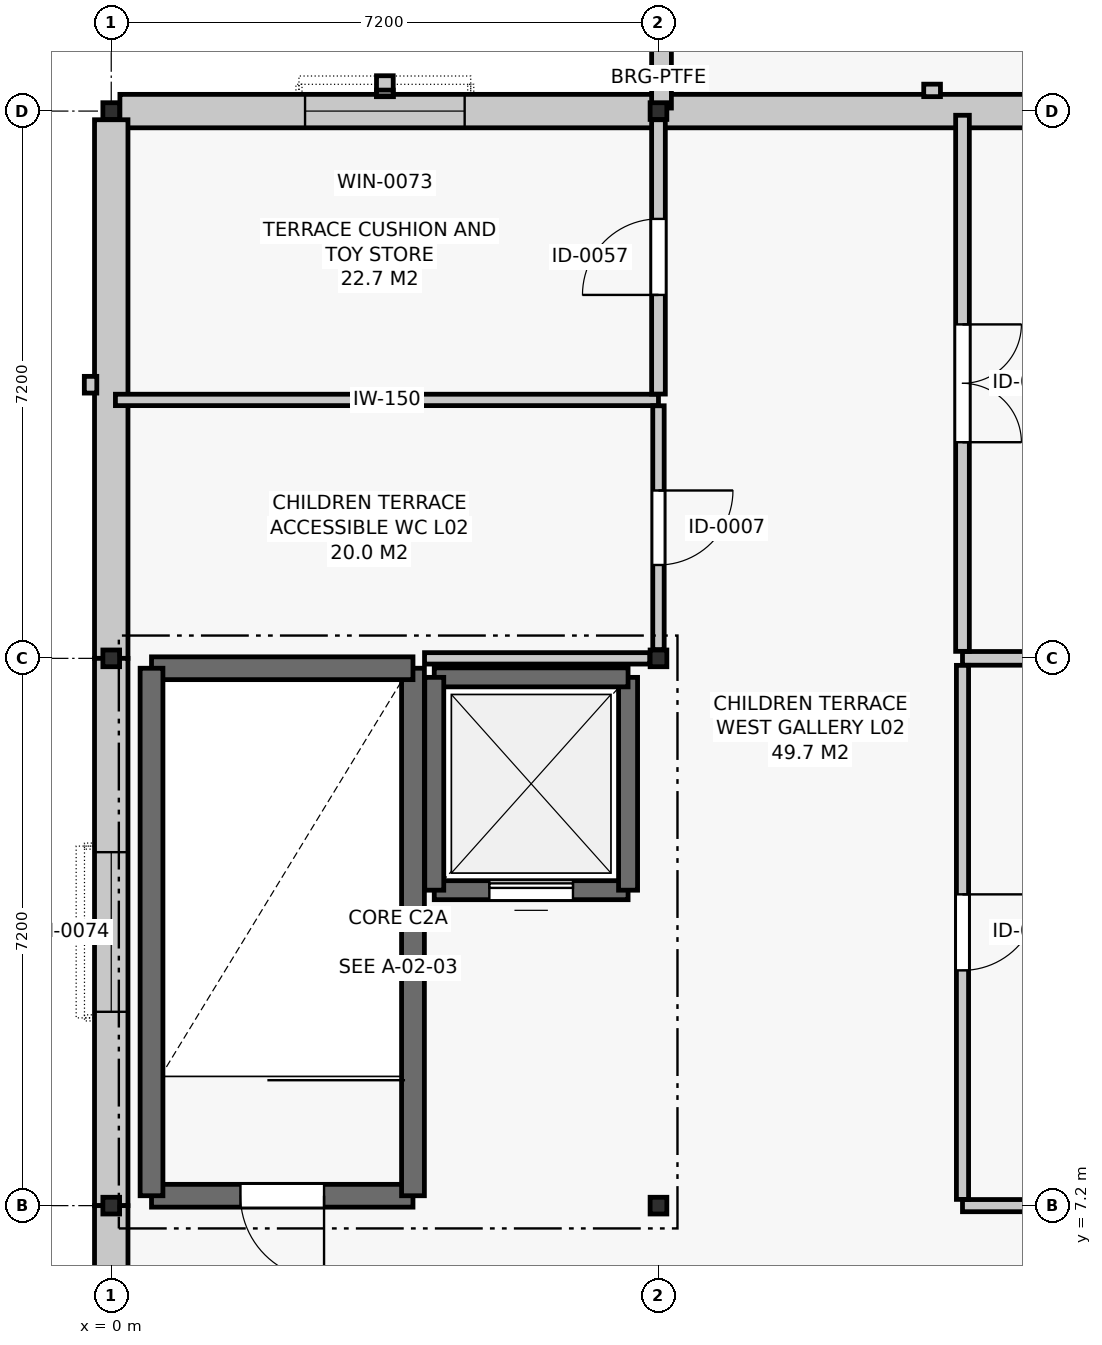
"""IFC4 building model, lengths in metres.
Left out: names, types, materials, properties, quantities, classifications, styles, units other than length and angle.
Written with IfcOpenShell. Run it as: python <this file> out.ifc"""

import sys

from ifc_helpers import new_model, si_unit, direction, frame, frame_2d, origin, origin_2d, place, context, subcontext, project, spatial, rectangle, i_section, extrude, element, fill, save


model = new_model("IFC4")
c1 = context("Model", 3, precision=1e-05, world=origin(), true_north=direction((0.0, 1.0)))
c2 = subcontext(c1, "Body", "Model", "MODEL_VIEW")
j1 = project(units=[si_unit("LENGTHUNIT", "METRE"), si_unit("PLANEANGLEUNIT", "RADIAN")], contexts=[c1])
p1 = place(None, origin())
s1 = spatial("IfcSite", under=j1, at=p1, CompositionType="ELEMENT")
p2 = place(p1, origin())
s2 = spatial("IfcBuilding", under=s1, at=p2, CompositionType="ELEMENT")
p3 = place(p2, frame((0.0, 0.0, 10.2)))
s3 = spatial("IfcBuildingStorey", under=s2, at=p3, CompositionType="ELEMENT", Elevation=10.2)
for number, where, z_axis, x_axis in (
    (1, (0.0, 7.2, 0.0), (0.0, 0.0, 1.0), (1.0, 0.0, 0.0)),
    (2, (0.0, 14.4, 0.0), (0.0, 0.0, 1.0), (1.0, 0.0, 0.0)),
    (3, (0.0, 21.6, 0.0), (0.0, 0.0, 1.0), (1.0, 0.0, 0.0)),
    (4, (7.2, 7.2, 0.0), (0.0, 0.0, 1.0), (1.0, 0.0, 0.0)),
    (5, (7.2, 14.4, 0.0), (0.0, 0.0, 1.0), (1.0, 0.0, 0.0)),
    (6, (7.2, 21.6, 0.0), (0.0, 0.0, 1.0), (1.0, 0.0, 0.0)),
):
    element("IfcColumn", number, at=place(p3, frame(where, z_axis=z_axis, x_axis=x_axis)), inside=s3, PredefinedType="COLUMN", context=c2, shape_type="SweptSolid", body=[
        extrude(i_section(OverallWidth=0.22, OverallDepth=0.22, WebThickness=0.01, FlangeThickness=0.016, FilletRadius=0.018, at=origin_2d()), origin(), (0.0, 0.0, 1.0), 4.2),
    ])
p4 = place(p3, frame((14.4, 21.6, 0.0), z_axis=(0.0, 0.0, 1.0), x_axis=(-1.0, 0.0, 0.0)))
e7 = element("IfcWall", 7, at=p4, inside=s3, PredefinedType="SOLIDWALL", context=c2, shape_type="SweptSolid", body=[
    extrude(rectangle(XDim=7.2, YDim=0.44, at=frame_2d((3.6, 0.0))), origin(), (0.0, 0.0, 1.0), 3.24),
])
p5 = place(p3, frame((7.2, 21.6, 0.0), z_axis=(0.0, 0.0, 1.0), x_axis=(-1.0, 0.0, 0.0)))
e8 = element("IfcWall", 8, at=p5, inside=s3, PredefinedType="SOLIDWALL", context=c2, shape_type="SweptSolid", body=[
    extrude(rectangle(XDim=7.086, YDim=0.44, at=frame_2d((3.543, 0.0))), origin(), (0.0, 0.0, 1.0), 3.24),
])
p6 = place(p5, frame((2.55, 0.0, 0.9)))
e9 = element("IfcOpeningElement", 9, at=p6, cuts=e8, PredefinedType="OPENING", context=c2, shape_type="SweptSolid", body=[
    extrude(rectangle(XDim=2.1, YDim=2.1, at=frame_2d((1.05, 1.05))), frame((0.0, 0.232, 0.0), z_axis=(0.0, -1.0, 0.0), x_axis=(1.0, 0.0, 0.0)), (0.0, 0.0, 1.0), 0.464),
])
p7 = place(p3, frame((0.0, 21.486, 0.0), z_axis=(0.0, 0.0, 1.0), x_axis=(0.0, -1.0, 0.0)))
e10 = element("IfcWall", 10, at=p7, inside=s3, PredefinedType="SOLIDWALL", context=c2, shape_type="SweptSolid", body=[
    extrude(rectangle(XDim=7.086, YDim=0.44, at=frame_2d((3.543, 0.0))), origin(), (0.0, 0.0, 1.0), 3.24),
])
p8 = place(p3, frame((0.0, 14.4, 0.0), z_axis=(0.0, 0.0, 1.0), x_axis=(0.0, -1.0, 0.0)))
e11 = element("IfcWall", 11, at=p8, inside=s3, PredefinedType="SOLIDWALL", context=c2, shape_type="SweptSolid", body=[
    extrude(rectangle(XDim=7.2, YDim=0.44, at=frame_2d((3.6, 0.0))), origin(), (0.0, 0.0, 1.0), 3.24),
])
p9 = place(p8, frame((2.55, 0.0, 0.9)))
e12 = element("IfcOpeningElement", 12, at=p9, cuts=e11, PredefinedType="OPENING", context=c2, shape_type="SweptSolid", body=[
    extrude(rectangle(XDim=2.1, YDim=2.1, at=frame_2d((1.05, 1.05))), frame((0.0, 0.232, 0.0), z_axis=(0.0, -1.0, 0.0), x_axis=(1.0, 0.0, 0.0)), (0.0, 0.0, 1.0), 0.464),
])
p10 = place(p3, frame((0.0, 7.2, 0.0), z_axis=(0.0, 0.0, 1.0), x_axis=(0.0, -1.0, 0.0)))
e13 = element("IfcWall", 13, at=p10, inside=s3, PredefinedType="SOLIDWALL", context=c2, shape_type="SweptSolid", body=[
    extrude(rectangle(XDim=7.086, YDim=0.44, at=frame_2d((3.543, 0.0))), origin(), (0.0, 0.0, 1.0), 3.24),
])
p11 = place(p10, frame((2.55, 0.0, 0.9)))
e14 = element("IfcOpeningElement", 14, at=p11, cuts=e13, PredefinedType="OPENING", context=c2, shape_type="SweptSolid", body=[
    extrude(rectangle(XDim=2.1, YDim=2.1, at=frame_2d((1.05, 1.05))), frame((0.0, 0.232, 0.0), z_axis=(0.0, -1.0, 0.0), x_axis=(1.0, 0.0, 0.0)), (0.0, 0.0, 1.0), 0.464),
])
p12 = place(p3, frame((7.24, 28.76, 0.0), z_axis=(0.0, 0.0, 1.0), x_axis=(0.0, -1.0, 0.0)))
e15 = element("IfcWall", 15, at=p12, inside=s3, PredefinedType="PARAPET", context=c2, shape_type="SweptSolid", body=[
    extrude(rectangle(XDim=7.12, YDim=0.26, at=frame_2d((3.56, 0.0))), origin(), (0.0, 0.0, 1.0), 0.9),
])
p13 = place(p3, frame((0.53, 7.33, 0.0), z_axis=(0.0, 0.0, 1.0), x_axis=(1.0, 0.0, 0.0)))
e16 = element("IfcWall", 16, at=p13, inside=s3, PredefinedType="SHEAR", context=c2, shape_type="SweptSolid", body=[
    extrude(rectangle(XDim=3.44, YDim=0.3, at=frame_2d((1.72, 0.0))), origin(), (0.0, 0.0, 1.0), 3.96),
])
p14 = place(p13, frame((1.17, 0.0, 0.0)))
e17 = element("IfcOpeningElement", 17, at=p14, cuts=e16, PredefinedType="OPENING", context=c2, shape_type="SweptSolid", body=[
    extrude(rectangle(XDim=1.1, YDim=2.15, at=frame_2d((0.55, 1.075))), frame((0.0, 0.162, 0.0), z_axis=(0.0, -1.0, 0.0), x_axis=(1.0, 0.0, 0.0)), (0.0, 0.0, 1.0), 0.324),
])
p15 = place(p3, frame((3.97, 7.33, 0.0), z_axis=(0.0, 0.0, 1.0), x_axis=(0.0, 1.0, 0.0)))
e18 = element("IfcWall", 18, at=p15, inside=s3, PredefinedType="SHEAR", context=c2, shape_type="SweptSolid", body=[
    extrude(rectangle(XDim=6.94, YDim=0.3, at=frame_2d((3.47, 0.0))), origin(), (0.0, 0.0, 1.0), 3.96),
])
p16 = place(p3, frame((3.97, 14.27, 0.0), z_axis=(0.0, 0.0, 1.0), x_axis=(-1.0, 0.0, 0.0)))
e19 = element("IfcWall", 19, at=p16, inside=s3, PredefinedType="SHEAR", context=c2, shape_type="SweptSolid", body=[
    extrude(rectangle(XDim=3.44, YDim=0.3, at=frame_2d((1.72, 0.0))), origin(), (0.0, 0.0, 1.0), 3.96),
])
p17 = place(p3, frame((0.53, 14.27, 0.0), z_axis=(0.0, 0.0, 1.0), x_axis=(0.0, -1.0, 0.0)))
e20 = element("IfcWall", 20, at=p17, inside=s3, PredefinedType="SHEAR", context=c2, shape_type="SweptSolid", body=[
    extrude(rectangle(XDim=6.94, YDim=0.3, at=frame_2d((3.47, 0.0))), origin(), (0.0, 0.0, 1.0), 3.96),
])
p18 = place(p3, frame((4.25, 11.35, 0.0), z_axis=(0.0, 0.0, 1.0), x_axis=(1.0, 0.0, 0.0)))
e21 = element("IfcWall", 21, at=p18, inside=s3, PredefinedType="SHEAR", context=c2, shape_type="SweptSolid", body=[
    extrude(rectangle(XDim=2.55, YDim=0.25, at=frame_2d((1.275, 0.0))), origin(), (0.0, 0.0, 1.0), 3.96),
])
p19 = place(p18, frame((0.725, 0.0, 0.0)))
e22 = element("IfcOpeningElement", 22, at=p19, cuts=e21, PredefinedType="OPENING", context=c2, shape_type="SweptSolid", body=[
    extrude(rectangle(XDim=1.1, YDim=2.1, at=frame_2d((0.55, 1.05))), frame((0.0, 0.137, 0.0), z_axis=(0.0, -1.0, 0.0), x_axis=(1.0, 0.0, 0.0)), (0.0, 0.0, 1.0), 0.274),
])
p20 = place(p3, frame((6.8, 11.35, 0.0), z_axis=(0.0, 0.0, 1.0), x_axis=(0.0, 1.0, 0.0)))
e23 = element("IfcWall", 23, at=p20, inside=s3, PredefinedType="SHEAR", context=c2, shape_type="SweptSolid", body=[
    extrude(rectangle(XDim=2.8, YDim=0.25, at=frame_2d((1.4, 0.0))), origin(), (0.0, 0.0, 1.0), 3.96),
])
p21 = place(p3, frame((6.8, 14.15, 0.0), z_axis=(0.0, 0.0, 1.0), x_axis=(-1.0, 0.0, 0.0)))
e24 = element("IfcWall", 24, at=p21, inside=s3, PredefinedType="SHEAR", context=c2, shape_type="SweptSolid", body=[
    extrude(rectangle(XDim=2.55, YDim=0.25, at=frame_2d((1.275, 0.0))), origin(), (0.0, 0.0, 1.0), 3.96),
])
p22 = place(p3, frame((4.25, 14.15, 0.0), z_axis=(0.0, 0.0, 1.0), x_axis=(0.0, -1.0, 0.0)))
e25 = element("IfcWall", 25, at=p22, inside=s3, PredefinedType="SHEAR", context=c2, shape_type="SweptSolid", body=[
    extrude(rectangle(XDim=2.8, YDim=0.25, at=frame_2d((1.4, 0.0))), origin(), (0.0, 0.0, 1.0), 3.96),
])
p23 = place(p3, frame((4.122, 14.4, 0.0), z_axis=(0.0, 0.0, 1.0), x_axis=(1.0, 0.0, 0.0)))
e26 = element("IfcWall", 26, at=p23, inside=s3, PredefinedType="PARTITIONING", context=c2, shape_type="SweptSolid", body=[
    extrude(rectangle(XDim=2.964, YDim=0.15, at=frame_2d((1.482, 0.0))), origin(), (0.0, 0.0, 1.0), 3.595),
])
p24 = place(p3, frame((0.055, 17.8, 0.0), z_axis=(0.0, 0.0, 1.0), x_axis=(1.0, 0.0, 0.0)))
e27 = element("IfcWall", 27, at=p24, inside=s3, PredefinedType="PARTITIONING", context=c2, shape_type="SweptSolid", body=[
    extrude(rectangle(XDim=7.145, YDim=0.15, at=frame_2d((3.573, 0.0))), origin(), (0.0, 0.0, 1.0), 3.395),
])
p25 = place(p3, frame((11.2, 14.4, 0.0), z_axis=(0.0, 0.0, 1.0), x_axis=(1.0, 0.0, 0.0)))
e28 = element("IfcWall", 28, at=p25, inside=s3, PredefinedType="PARTITIONING", context=c2, shape_type="SweptSolid", body=[
    extrude(rectangle(XDim=3.086, YDim=0.18, at=frame_2d((1.543, 0.0))), origin(), (0.0, 0.0, 1.0), 3.595),
])
p26 = place(p3, frame((11.2, 7.2, 0.0), z_axis=(0.0, 0.0, 1.0), x_axis=(1.0, 0.0, 0.0)))
e29 = element("IfcWall", 29, at=p26, inside=s3, PredefinedType="PARTITIONING", context=c2, shape_type="SweptSolid", body=[
    extrude(rectangle(XDim=3.086, YDim=0.16, at=frame_2d((1.543, 0.0))), origin(), (0.0, 0.0, 1.0), 3.595),
])
p27 = place(p3, frame((7.2, 14.514, 0.0), z_axis=(0.0, 0.0, 1.0), x_axis=(0.0, 1.0, 0.0)))
e30 = element("IfcWall", 30, at=p27, inside=s3, PredefinedType="PARTITIONING", context=c2, shape_type="SweptSolid", body=[
    extrude(rectangle(XDim=3.209, YDim=0.15, at=frame_2d((1.604, 0.0))), origin(), (0.0, 0.0, 1.0), 3.595),
])
p28 = place(p27, frame((1.115, 0.0, 0.0)))
e31 = element("IfcOpeningElement", 31, at=p28, cuts=e30, PredefinedType="OPENING", context=c2, shape_type="SweptSolid", body=[
    extrude(rectangle(XDim=0.98, YDim=2.1, at=frame_2d((0.49, 1.05))), frame((0.0, 0.087, 0.0), z_axis=(0.0, -1.0, 0.0), x_axis=(1.0, 0.0, 0.0)), (0.0, 0.0, 1.0), 0.174),
])
p29 = place(p3, frame((7.2, 17.877, 0.0), z_axis=(0.0, 0.0, 1.0), x_axis=(0.0, 1.0, 0.0)))
e32 = element("IfcWall", 32, at=p29, inside=s3, PredefinedType="PARTITIONING", context=c2, shape_type="SweptSolid", body=[
    extrude(rectangle(XDim=3.609, YDim=0.18, at=frame_2d((1.805, 0.0))), origin(), (0.0, 0.0, 1.0), 3.595),
])
p30 = place(p29, frame((1.304, 0.0, 0.0)))
e33 = element("IfcOpeningElement", 33, at=p30, cuts=e32, PredefinedType="OPENING", context=c2, shape_type="SweptSolid", body=[
    extrude(rectangle(XDim=1.0, YDim=2.15, at=frame_2d((0.5, 1.075))), frame((0.0, 0.102, 0.0), z_axis=(0.0, -1.0, 0.0), x_axis=(1.0, 0.0, 0.0)), (0.0, 0.0, 1.0), 0.204),
])
p31 = place(p3, frame((11.2, 14.492, 0.0), z_axis=(0.0, 0.0, 1.0), x_axis=(0.0, 1.0, 0.0)))
e34 = element("IfcWall", 34, at=p31, inside=s3, PredefinedType="PARTITIONING", context=c2, shape_type="SweptSolid", body=[
    extrude(rectangle(XDim=7.053, YDim=0.18, at=frame_2d((3.526, 0.0))), origin(), (0.0, 0.0, 1.0), 3.395),
])
p32 = place(p31, frame((2.751, 0.0, 0.0)))
e35 = element("IfcOpeningElement", 35, at=p32, cuts=e34, PredefinedType="OPENING", context=c2, shape_type="SweptSolid", body=[
    extrude(rectangle(XDim=1.55, YDim=2.2, at=frame_2d((0.775, 1.1))), frame((0.0, 0.102, 0.0), z_axis=(0.0, -1.0, 0.0), x_axis=(1.0, 0.0, 0.0)), (0.0, 0.0, 1.0), 0.204),
])
p33 = place(p3, frame((11.2, 7.282, 0.0), z_axis=(0.0, 0.0, 1.0), x_axis=(0.0, 1.0, 0.0)))
e36 = element("IfcWall", 36, at=p33, inside=s3, PredefinedType="PARTITIONING", context=c2, shape_type="SweptSolid", body=[
    extrude(rectangle(XDim=7.026, YDim=0.16, at=frame_2d((3.513, 0.0))), origin(), (0.0, 0.0, 1.0), 3.645),
])
p34 = place(p33, frame((3.013, 0.0, 0.0)))
e37 = element("IfcOpeningElement", 37, at=p34, cuts=e36, PredefinedType="OPENING", context=c2, shape_type="SweptSolid", body=[
    extrude(rectangle(XDim=1.0, YDim=2.15, at=frame_2d((0.5, 1.075))), frame((0.0, 0.092, 0.0), z_axis=(0.0, -1.0, 0.0), x_axis=(1.0, 0.0, 0.0)), (0.0, 0.0, 1.0), 0.184),
])
p35 = place(p6, origin())
e38 = element("IfcWindow", 38, at=p35, inside=s3, PartitioningType="SINGLE_PANEL", PredefinedType="WINDOW", context=c2, shape_type="SweptSolid", body=[
    extrude(rectangle(XDim=2.1, YDim=2.1, at=frame_2d((1.05, 1.05))), frame((0.0, 0.03, 0.0), z_axis=(0.0, -1.0, 0.0), x_axis=(1.0, 0.0, 0.0)), (0.0, 0.0, 1.0), 0.06),
])
fill(e9, e38)
p36 = place(p9, origin())
e39 = element("IfcWindow", 39, at=p36, inside=s3, PartitioningType="SINGLE_PANEL", PredefinedType="WINDOW", context=c2, shape_type="SweptSolid", body=[
    extrude(rectangle(XDim=2.1, YDim=2.1, at=frame_2d((1.05, 1.05))), frame((0.0, 0.03, 0.0), z_axis=(0.0, -1.0, 0.0), x_axis=(1.0, 0.0, 0.0)), (0.0, 0.0, 1.0), 0.06),
])
fill(e12, e39)
p37 = place(p14, frame((1.1, 0.0, 0.0), z_axis=(0.0, 0.0, 1.0), x_axis=(-1.0, 0.0, 0.0)))
e40 = element("IfcDoor", 40, at=p37, inside=s3, OperationType="SINGLE_SWING_LEFT", PredefinedType="DOOR", context=c2, shape_type="SweptSolid", body=[
    extrude(rectangle(XDim=1.1, YDim=2.15, at=frame_2d((0.55, 1.075))), frame((0.0, 0.025, 0.0), z_axis=(0.0, -1.0, 0.0), x_axis=(1.0, 0.0, 0.0)), (0.0, 0.0, 1.0), 0.05),
])
fill(e17, e40)
p38 = place(p19, origin())
e41 = element("IfcDoor", 41, at=p38, inside=s3, OperationType="SLIDING_TO_LEFT", PredefinedType="DOOR", context=c2, shape_type="SweptSolid", body=[
    extrude(rectangle(XDim=1.1, YDim=2.1, at=frame_2d((0.55, 1.05))), frame((0.0, 0.025, 0.0), z_axis=(0.0, -1.0, 0.0), x_axis=(1.0, 0.0, 0.0)), (0.0, 0.0, 1.0), 0.05),
])
fill(e22, e41)
p39 = place(p28, frame((0.98, 0.0, 0.0), z_axis=(0.0, 0.0, 1.0), x_axis=(-1.0, 0.0, 0.0)))
e42 = element("IfcDoor", 42, at=p39, inside=s3, OperationType="SINGLE_SWING_LEFT", PredefinedType="DOOR", context=c2, shape_type="SweptSolid", body=[
    extrude(rectangle(XDim=0.98, YDim=2.1, at=frame_2d((0.49, 1.05))), frame((0.0, 0.025, 0.0), z_axis=(0.0, -1.0, 0.0), x_axis=(1.0, 0.0, 0.0)), (0.0, 0.0, 1.0), 0.05),
])
fill(e31, e42)
p40 = place(p30, origin())
e43 = element("IfcDoor", 43, at=p40, inside=s3, OperationType="SINGLE_SWING_LEFT", PredefinedType="DOOR", context=c2, shape_type="SweptSolid", body=[
    extrude(rectangle(XDim=1.0, YDim=2.15, at=frame_2d((0.5, 1.075))), frame((0.0, 0.025, 0.0), z_axis=(0.0, -1.0, 0.0), x_axis=(1.0, 0.0, 0.0)), (0.0, 0.0, 1.0), 0.05),
])
fill(e33, e43)
p41 = place(p32, frame((1.55, 0.0, 0.0), z_axis=(0.0, 0.0, 1.0), x_axis=(-1.0, 0.0, 0.0)))
e44 = element("IfcDoor", 44, at=p41, inside=s3, OperationType="DOUBLE_DOOR_SINGLE_SWING", PredefinedType="DOOR", context=c2, shape_type="SweptSolid", body=[
    extrude(rectangle(XDim=1.55, YDim=2.2, at=frame_2d((0.775, 1.1))), frame((0.0, 0.025, 0.0), z_axis=(0.0, -1.0, 0.0), x_axis=(1.0, 0.0, 0.0)), (0.0, 0.0, 1.0), 0.05),
])
fill(e35, e44)
p42 = place(p34, frame((1.0, 0.0, 0.0), z_axis=(0.0, 0.0, 1.0), x_axis=(-1.0, 0.0, 0.0)))
e45 = element("IfcDoor", 45, at=p42, inside=s3, OperationType="SINGLE_SWING_LEFT", PredefinedType="DOOR", context=c2, shape_type="SweptSolid", body=[
    extrude(rectangle(XDim=1.0, YDim=2.15, at=frame_2d((0.5, 1.075))), frame((0.0, 0.025, 0.0), z_axis=(0.0, -1.0, 0.0), x_axis=(1.0, 0.0, 0.0)), (0.0, 0.0, 1.0), 0.05),
])
fill(e37, e45)
save(model, sys.argv[1])
